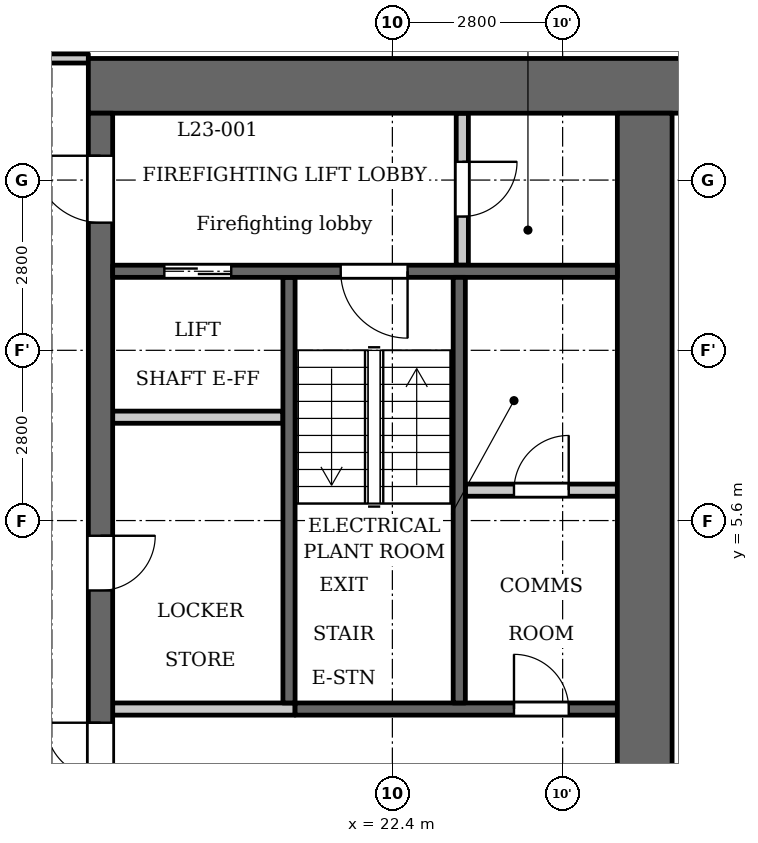
"""IFC4 building model, lengths in metres.
Left out: names, types, materials, properties, quantities, classifications, styles, units other than length and angle.
Written with IfcOpenShell. Run it as: python <this file> out.ifc"""

import sys

from ifc_helpers import new_model, si_unit, direction, frame, frame_2d, origin, place, context, subcontext, project, spatial, rectangle, extrude, element, fill, save


model = new_model("IFC4")
c1 = context("Model", 3, precision=1e-05, world=origin(), true_north=direction((0.0, 1.0)))
c2 = subcontext(c1, "Body", "Model", "MODEL_VIEW")
j1 = project(units=[si_unit("LENGTHUNIT", "METRE"), si_unit("PLANEANGLEUNIT", "RADIAN")], contexts=[c1])
p1 = place(None, origin())
s1 = spatial("IfcSite", under=j1, at=p1, CompositionType="ELEMENT")
p2 = place(p1, origin())
s2 = spatial("IfcBuilding", under=s1, at=p2, CompositionType="ELEMENT")
p3 = place(p2, frame((0.0, 0.0, 93.8)))
s3 = spatial("IfcBuildingStorey", under=s2, at=p3, CompositionType="ELEMENT", Elevation=93.8)
p4 = place(p3, frame((20.7, 2.6, 0.0), z_axis=(0.0, 0.0, 1.0), x_axis=(0.0, 1.0, 0.0)))
e1 = element("IfcWall", 1, at=p4, inside=s3, PredefinedType="SHEAR", context=c2, shape_type="SweptSolid", body=[
    extrude(rectangle(XDim=7.0, YDim=0.2, at=frame_2d((3.5, 0.0))), origin(), (0.0, 0.0, 1.0), 3.2),
])
p5 = place(p3, frame((20.8, 2.5, 0.0), z_axis=(0.0, 0.0, 1.0), x_axis=(1.0, 0.0, 0.0)))
e2 = element("IfcWall", 2, at=p5, inside=s3, PredefinedType="SHEAR", context=c2, shape_type="SweptSolid", body=[
    extrude(rectangle(XDim=5.3, YDim=0.2, at=frame_2d((2.65, 0.0))), origin(), (0.0, 0.0, 1.0), 3.2),
])
p6 = place(p5, frame((3.6, 0.0, 0.0)))
e3 = element("IfcOpeningElement", 3, at=p6, cuts=e2, PredefinedType="OPENING", context=c2, shape_type="SweptSolid", body=[
    extrude(rectangle(XDim=0.9, YDim=2.1, at=frame_2d((0.45, 1.05))), frame((0.0, 0.11, 0.0), z_axis=(0.0, -1.0, 0.0), x_axis=(1.0, 0.0, 0.0)), (0.0, 0.0, 1.0), 0.22),
])
p7 = place(p3, frame((17.4, 12.75, 0.0), z_axis=(0.0, 0.0, 1.0), x_axis=(1.0, 0.0, 0.0)))
e4 = element("IfcWall", 4, at=p7, inside=s3, PredefinedType="SHEAR", context=c2, shape_type="SweptSolid", body=[
    extrude(rectangle(XDim=10.4, YDim=0.9, at=frame_2d((5.2, 0.0))), origin(), (0.0, 0.0, 1.0), 3.2),
])
p8 = place(p3, frame((17.6, -12.3, 0.0), z_axis=(0.0, 0.0, 1.0), x_axis=(0.0, 1.0, 0.0)))
e5 = element("IfcWall", 5, at=p8, inside=s3, PredefinedType="SHEAR", context=c2, shape_type="SweptSolid", body=[
    extrude(rectangle(XDim=24.6, YDim=0.4, at=frame_2d((12.3, 0.0))), origin(), (0.0, 0.0, 1.0), 3.2),
])
p9 = place(p8, frame((6.0, 0.0, 0.0)))
e6 = element("IfcOpeningElement", 6, at=p9, cuts=e5, PredefinedType="OPENING", context=c2, shape_type="SweptSolid", body=[
    extrude(rectangle(XDim=1.1, YDim=2.1, at=frame_2d((0.55, 1.05))), frame((0.0, 0.21, 0.0), z_axis=(0.0, -1.0, 0.0), x_axis=(1.0, 0.0, 0.0)), (0.0, 0.0, 1.0), 0.42),
])
p10 = place(p8, frame((8.4, 0.0, 0.0)))
e7 = element("IfcOpeningElement", 7, at=p10, cuts=e5, PredefinedType="OPENING", context=c2, shape_type="SweptSolid", body=[
    extrude(rectangle(XDim=1.1, YDim=2.1, at=frame_2d((0.55, 1.05))), frame((0.0, 0.21, 0.0), z_axis=(0.0, -1.0, 0.0), x_axis=(1.0, 0.0, 0.0)), (0.0, 0.0, 1.0), 0.42),
])
p11 = place(p8, frame((10.8, 0.0, 0.0)))
e8 = element("IfcOpeningElement", 8, at=p11, cuts=e5, PredefinedType="OPENING", context=c2, shape_type="SweptSolid", body=[
    extrude(rectangle(XDim=1.1, YDim=2.1, at=frame_2d((0.55, 1.05))), frame((0.0, 0.21, 0.0), z_axis=(0.0, -1.0, 0.0), x_axis=(1.0, 0.0, 0.0)), (0.0, 0.0, 1.0), 0.42),
])
p12 = place(p8, frame((16.75, 0.0, 0.0)))
e9 = element("IfcOpeningElement", 9, at=p12, cuts=e5, PredefinedType="OPENING", context=c2, shape_type="SweptSolid", body=[
    extrude(rectangle(XDim=0.9, YDim=2.1, at=frame_2d((0.45, 1.05))), frame((0.0, 0.21, 0.0), z_axis=(0.0, -1.0, 0.0), x_axis=(1.0, 0.0, 0.0)), (0.0, 0.0, 1.0), 0.42),
])
p13 = place(p8, frame((22.8, 0.0, 0.0)))
e10 = element("IfcOpeningElement", 10, at=p13, cuts=e5, PredefinedType="OPENING", context=c2, shape_type="SweptSolid", body=[
    extrude(rectangle(XDim=1.1, YDim=2.1, at=frame_2d((0.55, 1.05))), frame((0.0, 0.21, 0.0), z_axis=(0.0, -1.0, 0.0), x_axis=(1.0, 0.0, 0.0)), (0.0, 0.0, 1.0), 0.42),
])
p14 = place(p8, frame((0.7, 0.0, 0.0)))
e11 = element("IfcOpeningElement", 11, at=p14, cuts=e5, PredefinedType="OPENING", context=c2, shape_type="SweptSolid", body=[
    extrude(rectangle(XDim=1.1, YDim=2.1, at=frame_2d((0.55, 1.05))), frame((0.0, 0.21, 0.0), z_axis=(0.0, -1.0, 0.0), x_axis=(1.0, 0.0, 0.0)), (0.0, 0.0, 1.0), 0.42),
])
p15 = place(p8, frame((12.775, 0.0, 0.0)))
e12 = element("IfcOpeningElement", 12, at=p15, cuts=e5, PredefinedType="OPENING", context=c2, shape_type="SweptSolid", body=[
    extrude(rectangle(XDim=1.8, YDim=2.1, at=frame_2d((0.9, 1.05))), frame((0.0, 0.21, 0.0), z_axis=(0.0, -1.0, 0.0), x_axis=(1.0, 0.0, 0.0)), (0.0, 0.0, 1.0), 0.42),
])
p16 = place(p3, frame((26.55, -12.3, 0.0), z_axis=(0.0, 0.0, 1.0), x_axis=(0.0, 1.0, 0.0)))
e13 = element("IfcWall", 13, at=p16, inside=s3, PredefinedType="SHEAR", context=c2, shape_type="SweptSolid", body=[
    extrude(rectangle(XDim=24.6, YDim=0.9, at=frame_2d((12.3, 0.0))), origin(), (0.0, 0.0, 1.0), 3.2),
])
p17 = place(p3, frame((23.55, 9.8, 0.0), z_axis=(0.0, 0.0, 1.0), x_axis=(0.0, 1.0, 0.0)))
e14 = element("IfcWall", 14, at=p17, inside=s3, PredefinedType="PARTITIONING", context=c2, shape_type="SweptSolid", body=[
    extrude(rectangle(XDim=2.5, YDim=0.2, at=frame_2d((1.25, 0.0))), origin(), (0.0, 0.0, 1.0), 3.2),
])
p18 = place(p17, frame((0.8, 0.0, 0.0)))
e15 = element("IfcOpeningElement", 15, at=p18, cuts=e14, PredefinedType="OPENING", context=c2, shape_type="SweptSolid", body=[
    extrude(rectangle(XDim=0.9, YDim=2.1, at=frame_2d((0.45, 1.05))), frame((0.0, 0.11, 0.0), z_axis=(0.0, -1.0, 0.0), x_axis=(1.0, 0.0, 0.0)), (0.0, 0.0, 1.0), 0.22),
])
p19 = place(p3, frame((23.6, 6.1, 0.0), z_axis=(0.0, 0.0, 1.0), x_axis=(1.0, 0.0, 0.0)))
e16 = element("IfcWall", 16, at=p19, inside=s3, PredefinedType="PARTITIONING", context=c2, shape_type="SweptSolid", body=[
    extrude(rectangle(XDim=2.5, YDim=0.2, at=frame_2d((1.25, 0.0))), origin(), (0.0, 0.0, 1.0), 3.2),
])
p20 = place(p19, frame((0.8, 0.0, 0.0)))
e17 = element("IfcOpeningElement", 17, at=p20, cuts=e16, PredefinedType="OPENING", context=c2, shape_type="SweptSolid", body=[
    extrude(rectangle(XDim=0.9, YDim=2.1, at=frame_2d((0.45, 1.05))), frame((0.0, 0.11, 0.0), z_axis=(0.0, -1.0, 0.0), x_axis=(1.0, 0.0, 0.0)), (0.0, 0.0, 1.0), 0.22),
])
p21 = place(p3, frame((17.8, 2.5, 0.0), z_axis=(0.0, 0.0, 1.0), x_axis=(1.0, 0.0, 0.0)))
e18 = element("IfcWall", 18, at=p21, inside=s3, PredefinedType="PARTITIONING", context=c2, shape_type="SweptSolid", body=[
    extrude(rectangle(XDim=3.0, YDim=0.2, at=frame_2d((1.5, 0.0))), origin(), (0.0, 0.0, 1.0), 3.2),
])
p22 = place(p3, frame((17.8, 7.3, 0.0), z_axis=(0.0, 0.0, 1.0), x_axis=(1.0, 0.0, 0.0)))
e19 = element("IfcWall", 19, at=p22, inside=s3, PredefinedType="PARTITIONING", context=c2, shape_type="SweptSolid", body=[
    extrude(rectangle(XDim=2.8, YDim=0.2, at=frame_2d((1.4, 0.0))), origin(), (0.0, 0.0, 1.0), 3.2),
])
p23 = place(p3, frame((17.8, 9.7, 0.0), z_axis=(0.0, 0.0, 1.0), x_axis=(1.0, 0.0, 0.0)))
e20 = element("IfcWall", 20, at=p23, inside=s3, PredefinedType="SHEAR", context=c2, shape_type="SweptSolid", body=[
    extrude(rectangle(XDim=8.3, YDim=0.2, at=frame_2d((4.15, 0.0))), origin(), (0.0, 0.0, 1.0), 3.2),
])
p24 = place(p23, frame((0.85, 0.0, 0.0)))
e21 = element("IfcOpeningElement", 21, at=p24, cuts=e20, PredefinedType="OPENING", context=c2, shape_type="SweptSolid", body=[
    extrude(rectangle(XDim=1.1, YDim=2.1, at=frame_2d((0.55, 1.05))), frame((0.0, 0.11, 0.0), z_axis=(0.0, -1.0, 0.0), x_axis=(1.0, 0.0, 0.0)), (0.0, 0.0, 1.0), 0.22),
])
p25 = place(p23, frame((3.75, 0.0, 0.0)))
e22 = element("IfcOpeningElement", 22, at=p25, cuts=e20, PredefinedType="OPENING", context=c2, shape_type="SweptSolid", body=[
    extrude(rectangle(XDim=1.1, YDim=2.1, at=frame_2d((0.55, 1.05))), frame((0.0, 0.11, 0.0), z_axis=(0.0, -1.0, 0.0), x_axis=(1.0, 0.0, 0.0)), (0.0, 0.0, 1.0), 0.22),
])
p26 = place(p3, frame((23.5, 2.6, 0.0), z_axis=(0.0, 0.0, 1.0), x_axis=(0.0, 1.0, 0.0)))
e23 = element("IfcWall", 23, at=p26, inside=s3, PredefinedType="SHEAR", context=c2, shape_type="SweptSolid", body=[
    extrude(rectangle(XDim=7.0, YDim=0.2, at=frame_2d((3.5, 0.0))), origin(), (0.0, 0.0, 1.0), 3.2),
])
p27 = place(p3, frame((-17.4, 13.2, 0.0), z_axis=(0.0, 0.0, 1.0), x_axis=(1.0, 0.0, 0.0)))
e24 = element("IfcWall", 24, at=p27, inside=s3, PredefinedType="PARTITIONING", context=c2, shape_type="SweptSolid", body=[
    extrude(rectangle(XDim=34.8, YDim=0.15, at=frame_2d((17.4, 0.0))), origin(), (0.0, 0.0, 1.0), 3.2),
])
p28 = place(p27, frame((0.75, 0.0, 0.0)))
e25 = element("IfcOpeningElement", 25, at=p28, cuts=e24, PredefinedType="OPENING", context=c2, shape_type="SweptSolid", body=[
    extrude(rectangle(XDim=1.0, YDim=2.1, at=frame_2d((0.5, 1.05))), frame((0.0, 0.085, 0.0), z_axis=(0.0, -1.0, 0.0), x_axis=(1.0, 0.0, 0.0)), (0.0, 0.0, 1.0), 0.17),
])
p29 = place(p27, frame((33.15, 0.0, 0.0)))
e26 = element("IfcOpeningElement", 26, at=p29, cuts=e24, PredefinedType="OPENING", context=c2, shape_type="SweptSolid", body=[
    extrude(rectangle(XDim=1.0, YDim=2.1, at=frame_2d((0.5, 1.05))), frame((0.0, 0.085, 0.0), z_axis=(0.0, -1.0, 0.0), x_axis=(1.0, 0.0, 0.0)), (0.0, 0.0, 1.0), 0.17),
])
p30 = place(p27, frame((6.85, 0.0, 0.0)))
e27 = element("IfcOpeningElement", 27, at=p30, cuts=e24, PredefinedType="OPENING", context=c2, shape_type="SweptSolid", body=[
    extrude(rectangle(XDim=1.0, YDim=2.1, at=frame_2d((0.5, 1.05))), frame((0.0, 0.085, 0.0), z_axis=(0.0, -1.0, 0.0), x_axis=(1.0, 0.0, 0.0)), (0.0, 0.0, 1.0), 0.17),
])
p31 = place(p27, frame((15.45, 0.0, 0.0)))
e28 = element("IfcOpeningElement", 28, at=p31, cuts=e24, PredefinedType="OPENING", context=c2, shape_type="SweptSolid", body=[
    extrude(rectangle(XDim=1.0, YDim=2.1, at=frame_2d((0.5, 1.05))), frame((0.0, 0.085, 0.0), z_axis=(0.0, -1.0, 0.0), x_axis=(1.0, 0.0, 0.0)), (0.0, 0.0, 1.0), 0.17),
])
p32 = place(p27, frame((21.4, 0.0, 0.0)))
e29 = element("IfcOpeningElement", 29, at=p32, cuts=e24, PredefinedType="OPENING", context=c2, shape_type="SweptSolid", body=[
    extrude(rectangle(XDim=1.0, YDim=2.1, at=frame_2d((0.5, 1.05))), frame((0.0, 0.085, 0.0), z_axis=(0.0, -1.0, 0.0), x_axis=(1.0, 0.0, 0.0)), (0.0, 0.0, 1.0), 0.17),
])
p33 = place(p27, frame((23.65, 0.0, 0.0)))
e30 = element("IfcOpeningElement", 30, at=p33, cuts=e24, PredefinedType="OPENING", context=c2, shape_type="SweptSolid", body=[
    extrude(rectangle(XDim=1.0, YDim=2.1, at=frame_2d((0.5, 1.05))), frame((0.0, 0.085, 0.0), z_axis=(0.0, -1.0, 0.0), x_axis=(1.0, 0.0, 0.0)), (0.0, 0.0, 1.0), 0.17),
])
p34 = place(p12, origin())
e31 = element("IfcDoor", 31, at=p34, inside=s3, OperationType="SINGLE_SWING_RIGHT", PredefinedType="DOOR", context=c2, shape_type="SweptSolid", body=[
    extrude(rectangle(XDim=0.9, YDim=2.1, at=frame_2d((0.45, 1.05))), frame((0.0, 0.025, 0.0), z_axis=(0.0, -1.0, 0.0), x_axis=(1.0, 0.0, 0.0)), (0.0, 0.0, 1.0), 0.05),
])
fill(e9, e31)
p35 = place(p24, origin())
e32 = element("IfcDoor", 32, at=p35, inside=s3, OperationType="DOUBLE_DOOR_SLIDING", PredefinedType="DOOR", context=c2, shape_type="SweptSolid", body=[
    extrude(rectangle(XDim=1.1, YDim=2.1, at=frame_2d((0.55, 1.05))), frame((0.0, 0.025, 0.0), z_axis=(0.0, -1.0, 0.0), x_axis=(1.0, 0.0, 0.0)), (0.0, 0.0, 1.0), 0.05),
])
fill(e21, e32)
p36 = place(p13, origin())
e33 = element("IfcDoor", 33, at=p36, inside=s3, OperationType="SINGLE_SWING_LEFT", PredefinedType="DOOR", context=c2, shape_type="SweptSolid", body=[
    extrude(rectangle(XDim=1.1, YDim=2.1, at=frame_2d((0.55, 1.05))), frame((0.0, 0.025, 0.0), z_axis=(0.0, -1.0, 0.0), x_axis=(1.0, 0.0, 0.0)), (0.0, 0.0, 1.0), 0.05),
])
fill(e10, e33)
p37 = place(p18, origin())
e34 = element("IfcDoor", 34, at=p37, inside=s3, OperationType="SINGLE_SWING_RIGHT", PredefinedType="DOOR", context=c2, shape_type="SweptSolid", body=[
    extrude(rectangle(XDim=0.9, YDim=2.1, at=frame_2d((0.45, 1.05))), frame((0.0, 0.025, 0.0), z_axis=(0.0, -1.0, 0.0), x_axis=(1.0, 0.0, 0.0)), (0.0, 0.0, 1.0), 0.05),
])
fill(e15, e34)
p38 = place(p25, origin())
e35 = element("IfcDoor", 35, at=p38, inside=s3, OperationType="SINGLE_SWING_RIGHT", PredefinedType="DOOR", context=c2, shape_type="SweptSolid", body=[
    extrude(rectangle(XDim=1.1, YDim=2.1, at=frame_2d((0.55, 1.05))), frame((0.0, 0.025, 0.0), z_axis=(0.0, -1.0, 0.0), x_axis=(1.0, 0.0, 0.0)), (0.0, 0.0, 1.0), 0.05),
])
fill(e22, e35)
p39 = place(p15, origin())
e36 = element("IfcDoor", 36, at=p39, inside=s3, OperationType="DOUBLE_DOOR_SINGLE_SWING", PredefinedType="DOOR", context=c2, shape_type="SweptSolid", body=[
    extrude(rectangle(XDim=1.8, YDim=2.1, at=frame_2d((0.9, 1.05))), frame((0.0, 0.025, 0.0), z_axis=(0.0, -1.0, 0.0), x_axis=(1.0, 0.0, 0.0)), (0.0, 0.0, 1.0), 0.05),
])
fill(e12, e36)
p40 = place(p20, origin())
e37 = element("IfcDoor", 37, at=p40, inside=s3, OperationType="SINGLE_SWING_LEFT", PredefinedType="DOOR", context=c2, shape_type="SweptSolid", body=[
    extrude(rectangle(XDim=0.9, YDim=2.1, at=frame_2d((0.45, 1.05))), frame((0.0, 0.025, 0.0), z_axis=(0.0, -1.0, 0.0), x_axis=(1.0, 0.0, 0.0)), (0.0, 0.0, 1.0), 0.05),
])
fill(e17, e37)
p41 = place(p6, origin())
e38 = element("IfcDoor", 38, at=p41, inside=s3, OperationType="SINGLE_SWING_RIGHT", PredefinedType="DOOR", context=c2, shape_type="SweptSolid", body=[
    extrude(rectangle(XDim=0.9, YDim=2.1, at=frame_2d((0.45, 1.05))), frame((0.0, 0.025, 0.0), z_axis=(0.0, -1.0, 0.0), x_axis=(1.0, 0.0, 0.0)), (0.0, 0.0, 1.0), 0.05),
])
fill(e3, e38)
save(model, sys.argv[1])
